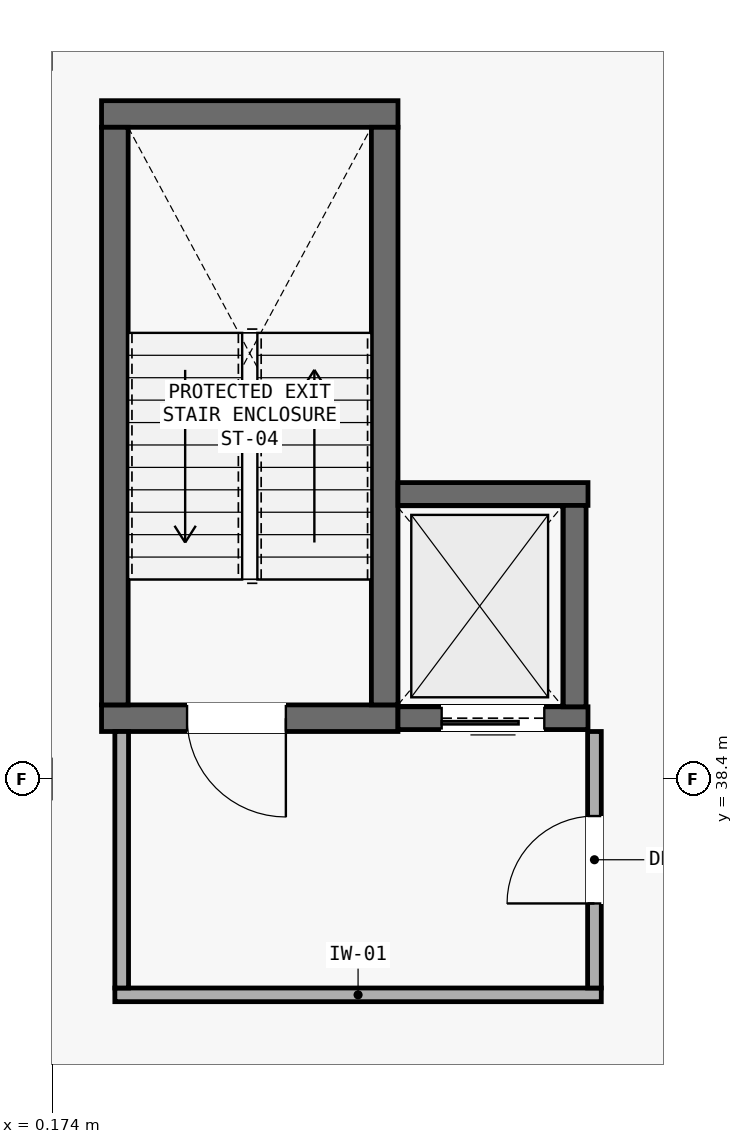
"""IFC4 building model, lengths in metres.
Left out: names, types, materials, properties, quantities, classifications, styles, units other than length and angle.
Written with IfcOpenShell. Run it as: python <this file> out.ifc"""

import sys

from ifc_helpers import new_model, si_unit, direction, frame, frame_2d, origin, place, context, subcontext, project, spatial, rectangle, extrude, element, fill, save


model = new_model("IFC4")
c1 = context("Model", 3, precision=1e-05, world=origin(), true_north=direction((0.0, 1.0)))
c2 = subcontext(c1, "Body", "Model", "MODEL_VIEW")
j1 = project(units=[si_unit("LENGTHUNIT", "METRE"), si_unit("PLANEANGLEUNIT", "RADIAN")], contexts=[c1])
p1 = place(None, origin())
s1 = spatial("IfcSite", under=j1, at=p1, CompositionType="ELEMENT")
p2 = place(p1, origin())
s2 = spatial("IfcBuilding", under=s1, at=p2, CompositionType="ELEMENT")
p3 = place(p2, frame((0.0, 0.0, 13.65)))
s3 = spatial("IfcBuildingStorey", under=s2, at=p3, CompositionType="ELEMENT", Elevation=13.65)
p4 = place(p3, frame((0.825, 39.2, 0.0), z_axis=(0.0, 0.0, 1.0), x_axis=(1.0, 0.0, 0.0)))
e1 = element("IfcWall", 1, at=p4, inside=s3, PredefinedType="SHEAR", context=c2, shape_type="SweptSolid", body=[
    extrude(rectangle(XDim=3.9, YDim=0.35, at=frame_2d((1.95, 0.0))), origin(), (0.0, 0.0, 1.0), 3.98),
])
p5 = place(p4, frame((1.125, 0.0, 0.0)))
e2 = element("IfcOpeningElement", 2, at=p5, cuts=e1, PredefinedType="OPENING", context=c2, shape_type="SweptSolid", body=[
    extrude(rectangle(XDim=1.3, YDim=2.15, at=frame_2d((0.65, 1.075))), frame((0.0, 0.185, 0.0), z_axis=(0.0, -1.0, 0.0), x_axis=(1.0, 0.0, 0.0)), (0.0, 0.0, 1.0), 0.37),
])
p6 = place(p3, frame((0.825, 47.15, 0.0), z_axis=(0.0, 0.0, 1.0), x_axis=(1.0, 0.0, 0.0)))
e3 = element("IfcWall", 3, at=p6, inside=s3, PredefinedType="SHEAR", context=c2, shape_type="SweptSolid", body=[
    extrude(rectangle(XDim=3.9, YDim=0.35, at=frame_2d((1.95, 0.0))), origin(), (0.0, 0.0, 1.0), 3.98),
])
for number, where, z_axis, x_axis in (
    (4, (1.0, 39.375, 0.0), (0.0, 0.0, 1.0), (0.0, 1.0, 0.0)),
    (5, (4.55, 39.375, 0.0), (0.0, 0.0, 1.0), (0.0, 1.0, 0.0)),
):
    element("IfcWall", number, at=place(p3, frame(where, z_axis=z_axis, x_axis=x_axis)), inside=s3, PredefinedType="SHEAR", context=c2, shape_type="SweptSolid", body=[
        extrude(rectangle(XDim=7.6, YDim=0.35, at=frame_2d((3.8, 0.0))), origin(), (0.0, 0.0, 1.0), 3.98),
    ])
p7 = place(p3, frame((4.725, 39.2, 0.0), z_axis=(0.0, 0.0, 1.0), x_axis=(1.0, 0.0, 0.0)))
e6 = element("IfcWall", 6, at=p7, inside=s3, PredefinedType="SHEAR", context=c2, shape_type="SweptSolid", body=[
    extrude(rectangle(XDim=2.5, YDim=0.3, at=frame_2d((1.25, 0.0))), origin(), (0.0, 0.0, 1.0), 3.98),
])
p8 = place(p7, frame((0.575, 0.0, 0.0)))
e7 = element("IfcOpeningElement", 7, at=p8, cuts=e6, PredefinedType="OPENING", context=c2, shape_type="SweptSolid", body=[
    extrude(rectangle(XDim=1.35, YDim=2.15, at=frame_2d((0.675, 1.075))), frame((0.0, 0.16, 0.0), z_axis=(0.0, -1.0, 0.0), x_axis=(1.0, 0.0, 0.0)), (0.0, 0.0, 1.0), 0.32),
])
p9 = place(p3, frame((4.725, 42.15, 0.0), z_axis=(0.0, 0.0, 1.0), x_axis=(1.0, 0.0, 0.0)))
e8 = element("IfcWall", 8, at=p9, inside=s3, PredefinedType="SHEAR", context=c2, shape_type="SweptSolid", body=[
    extrude(rectangle(XDim=2.5, YDim=0.3, at=frame_2d((1.25, 0.0))), origin(), (0.0, 0.0, 1.0), 3.98),
])
p10 = place(p3, frame((7.05, 39.35, 0.0), z_axis=(0.0, 0.0, 1.0), x_axis=(0.0, 1.0, 0.0)))
e9 = element("IfcWall", 9, at=p10, inside=s3, PredefinedType="SHEAR", context=c2, shape_type="SweptSolid", body=[
    extrude(rectangle(XDim=2.65, YDim=0.3, at=frame_2d((1.325, 0.0))), origin(), (0.0, 0.0, 1.0), 3.98),
])
p11 = place(p3, frame((1.0, 35.56, 0.0), z_axis=(0.0, 0.0, 1.0), x_axis=(1.0, 0.0, 0.0)))
e10 = element("IfcWall", 10, at=p11, inside=s3, PredefinedType="PARTITIONING", context=c2, shape_type="SweptSolid", body=[
    extrude(rectangle(XDim=6.4, YDim=0.18, at=frame_2d((3.2, 0.0))), origin(), (0.0, 0.0, 1.0), 3.98),
])
p12 = place(p3, frame((1.09, 35.65, 0.0), z_axis=(0.0, 0.0, 1.0), x_axis=(0.0, 1.0, 0.0)))
e11 = element("IfcWall", 11, at=p12, inside=s3, PredefinedType="PARTITIONING", context=c2, shape_type="SweptSolid", body=[
    extrude(rectangle(XDim=3.375, YDim=0.18, at=frame_2d((1.688, 0.0))), origin(), (0.0, 0.0, 1.0), 3.98),
])
p13 = place(p3, frame((7.31, 35.65, 0.0), z_axis=(0.0, 0.0, 1.0), x_axis=(0.0, 1.0, 0.0)))
e12 = element("IfcWall", 12, at=p13, inside=s3, PredefinedType="PARTITIONING", context=c2, shape_type="SweptSolid", body=[
    extrude(rectangle(XDim=3.375, YDim=0.18, at=frame_2d((1.688, 0.0))), origin(), (0.0, 0.0, 1.0), 3.98),
])
p14 = place(p13, frame((1.113, 0.0, 0.0)))
e13 = element("IfcOpeningElement", 13, at=p14, cuts=e12, PredefinedType="OPENING", context=c2, shape_type="SweptSolid", body=[
    extrude(rectangle(XDim=1.15, YDim=2.15, at=frame_2d((0.575, 1.075))), frame((0.0, 0.1, 0.0), z_axis=(0.0, -1.0, 0.0), x_axis=(1.0, 0.0, 0.0)), (0.0, 0.0, 1.0), 0.2),
])
p15 = place(p5, frame((1.3, 0.0, 0.0), z_axis=(0.0, 0.0, 1.0), x_axis=(-1.0, 0.0, 0.0)))
e14 = element("IfcDoor", 14, at=p15, inside=s3, OperationType="SINGLE_SWING_RIGHT", PredefinedType="DOOR", context=c2, shape_type="SweptSolid", body=[
    extrude(rectangle(XDim=1.3, YDim=2.15, at=frame_2d((0.65, 1.075))), frame((0.0, 0.025, 0.0), z_axis=(0.0, -1.0, 0.0), x_axis=(1.0, 0.0, 0.0)), (0.0, 0.0, 1.0), 0.05),
])
fill(e2, e14)
p16 = place(p8, frame((1.35, 0.0, 0.0), z_axis=(0.0, 0.0, 1.0), x_axis=(-1.0, 0.0, 0.0)))
e15 = element("IfcDoor", 15, at=p16, inside=s3, OperationType="SLIDING_TO_RIGHT", PredefinedType="DOOR", context=c2, shape_type="SweptSolid", body=[
    extrude(rectangle(XDim=1.35, YDim=2.15, at=frame_2d((0.675, 1.075))), frame((0.0, 0.025, 0.0), z_axis=(0.0, -1.0, 0.0), x_axis=(1.0, 0.0, 0.0)), (0.0, 0.0, 1.0), 0.05),
])
fill(e7, e15)
p17 = place(p14, origin())
e16 = element("IfcDoor", 16, at=p17, inside=s3, OperationType="SINGLE_SWING_LEFT", PredefinedType="DOOR", context=c2, shape_type="SweptSolid", body=[
    extrude(rectangle(XDim=1.15, YDim=2.15, at=frame_2d((0.575, 1.075))), frame((0.0, 0.025, 0.0), z_axis=(0.0, -1.0, 0.0), x_axis=(1.0, 0.0, 0.0)), (0.0, 0.0, 1.0), 0.05),
])
fill(e13, e16)
save(model, sys.argv[1])
